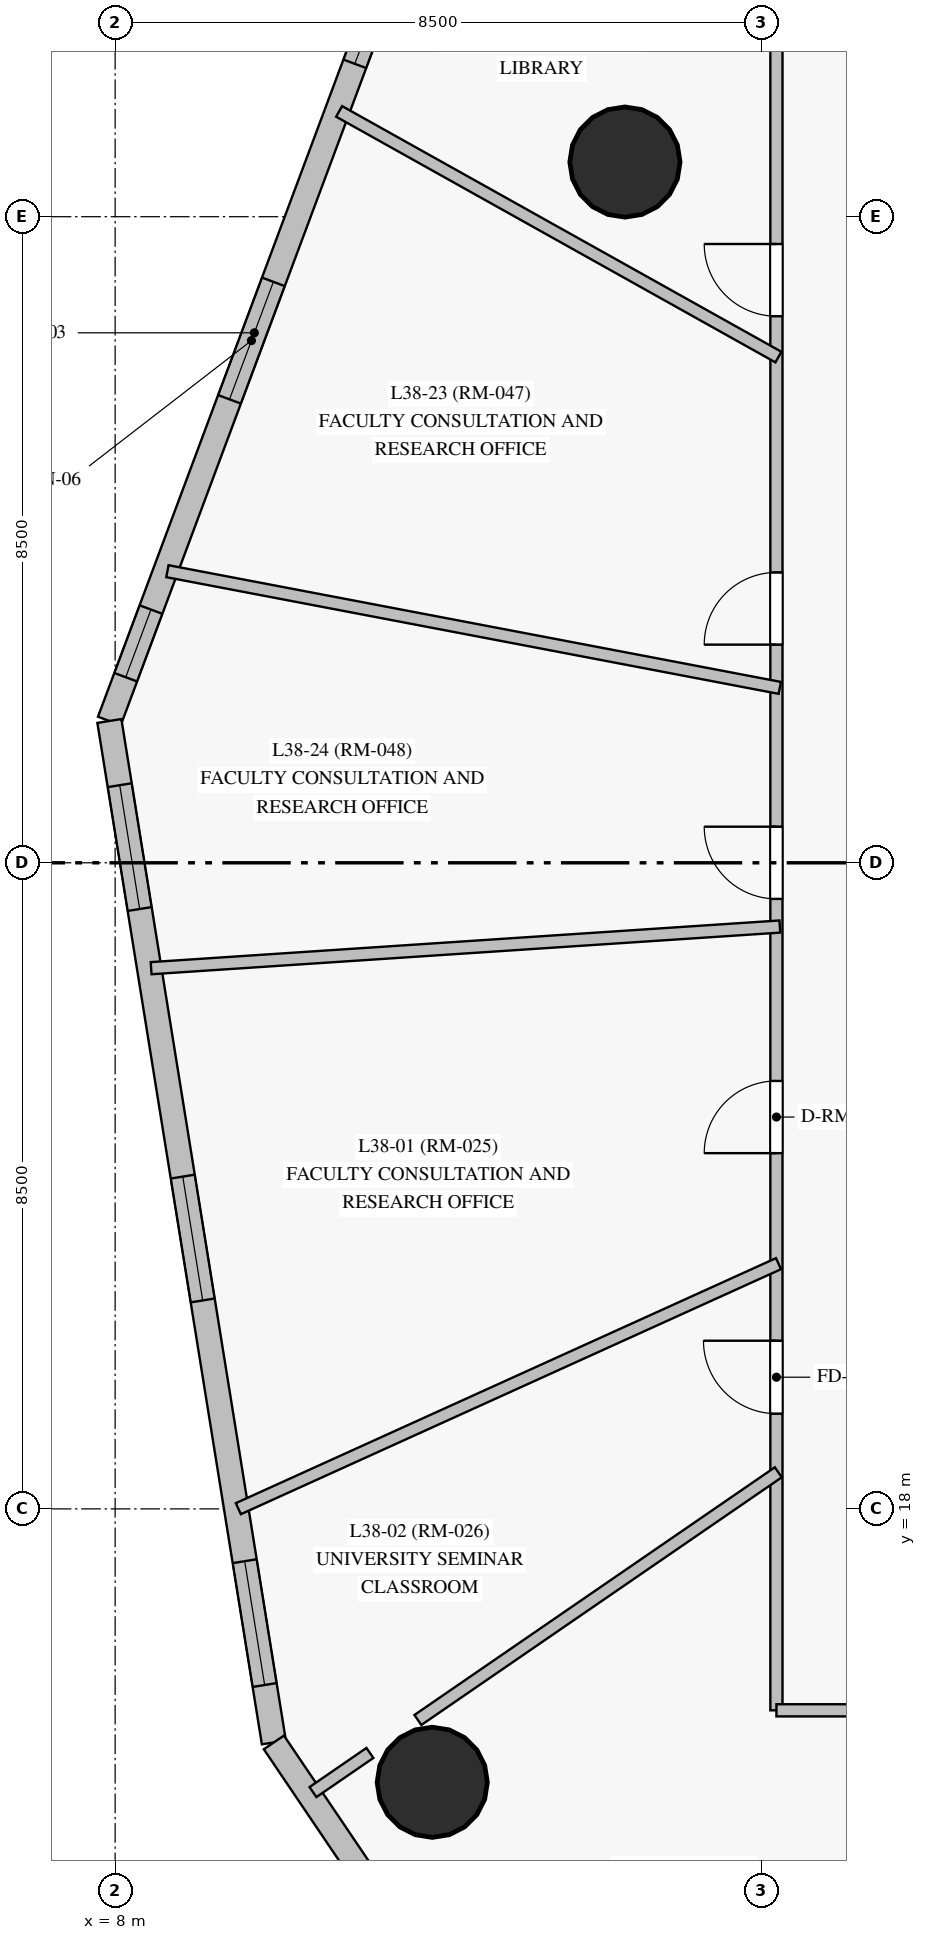
"""IFC4 building model, lengths in metres.
Left out: names, types, materials, properties, quantities, classifications, styles, units other than length and angle.
Written with IfcOpenShell. Run it as: python <this file> out.ifc"""

import sys

from ifc_helpers import new_model, si_unit, direction, frame, frame_2d, origin, origin_with_axes, origin_2d, place, context, subcontext, project, spatial, rectangle, circle, extrude, source, transform, mapped, element, fill, save


model = new_model("IFC4")
c1 = context("Model", 3, precision=1e-05, world=origin(), true_north=direction((0.0, 1.0)))
c2 = subcontext(c1, "Body", "Model", "MODEL_VIEW")
j1 = project(units=[si_unit("LENGTHUNIT", "METRE"), si_unit("PLANEANGLEUNIT", "RADIAN")], contexts=[c1])
p1 = place(None, origin())
s1 = spatial("IfcSite", under=j1, at=p1, CompositionType="ELEMENT")
p2 = place(p1, origin())
s2 = spatial("IfcBuilding", under=s1, at=p2, CompositionType="ELEMENT")
p3 = place(p2, frame((0.0, 0.0, 135.85)))
s3 = spatial("IfcBuildingStorey", under=s2, at=p3, CompositionType="ELEMENT", Elevation=135.85)
m1 = source(origin_with_axes(), c2, "Body", "SweptSolid", [
    extrude(circle(Radius=0.725, at=origin_2d()), origin(), (0.0, 0.0, 1.0), 3.05),
])
for number, where, z_axis, x_axis in (
    (1, (14.707, 35.719, 0.0), (0.0, 0.0, 1.0), (1.0, 0.0, 0.0)),
    (2, (12.172, 14.403, 0.0), (0.0, 0.0, 1.0), (1.0, 0.0, 0.0)),
):
    element("IfcColumn", number, at=place(p3, frame(where, z_axis=z_axis, x_axis=x_axis)), inside=s3, PredefinedType="COLUMN", context=c2, shape_type="MappedRepresentation", body=[
        mapped(m1, transform((0.0, 0.0, 0.0), scale=1.0)),
    ])
p4 = place(p3, frame((11.739, 38.579, 0.0), z_axis=(0.0, 0.0, 1.0), x_axis=(-0.349891213855, -0.936790338586, 0.0)))
e3 = element("IfcWall", 3, at=p4, inside=s3, PredefinedType="SOLIDWALL", context=c2, shape_type="SweptSolid", body=[
    extrude(rectangle(XDim=10.903, YDim=0.32, at=frame_2d((5.451, 0.0))), origin(), (0.0, 0.0, 1.0), 2.825),
])
p5 = place(p4, frame((0.724, 0.0, 0.85)))
e4 = element("IfcOpeningElement", 4, at=p5, cuts=e3, PredefinedType="OPENING", context=c2, shape_type="SweptSolid", body=[
    extrude(rectangle(XDim=0.95, YDim=1.5, at=frame_2d((0.475, 0.75))), frame((0.0, 0.17, 0.0), z_axis=(0.0, -1.0, 0.0), x_axis=(1.0, 0.0, 0.0)), (0.0, 0.0, 1.0), 0.34),
])
p6 = place(p4, frame((4.736, 0.0, 0.85)))
e5 = element("IfcOpeningElement", 5, at=p6, cuts=e3, PredefinedType="OPENING", context=c2, shape_type="SweptSolid", body=[
    extrude(rectangle(XDim=1.65, YDim=1.65, at=frame_2d((0.825, 0.825))), frame((0.0, 0.17, 0.0), z_axis=(0.0, -1.0, 0.0), x_axis=(1.0, 0.0, 0.0)), (0.0, 0.0, 1.0), 0.34),
])
p7 = place(p4, frame((9.338, 0.0, 0.85)))
e6 = element("IfcOpeningElement", 6, at=p7, cuts=e3, PredefinedType="OPENING", context=c2, shape_type="SweptSolid", body=[
    extrude(rectangle(XDim=0.95, YDim=1.5, at=frame_2d((0.475, 0.75))), frame((0.0, 0.17, 0.0), z_axis=(0.0, -1.0, 0.0), x_axis=(1.0, 0.0, 0.0)), (0.0, 0.0, 1.0), 0.34),
])
p8 = place(p3, frame((7.924, 28.366, 0.0), z_axis=(0.0, 0.0, 1.0), x_axis=(0.159012496048, -0.987276570218, 0.0)))
e7 = element("IfcWall", 7, at=p8, inside=s3, PredefinedType="SOLIDWALL", context=c2, shape_type="SweptSolid", body=[
    extrude(rectangle(XDim=13.611, YDim=0.32, at=frame_2d((6.805, 0.0))), origin(), (0.0, 0.0, 1.0), 2.825),
])
p9 = place(p8, frame((0.856, 0.0, 0.85)))
e8 = element("IfcOpeningElement", 8, at=p9, cuts=e7, PredefinedType="OPENING", context=c2, shape_type="SweptSolid", body=[
    extrude(rectangle(XDim=1.65, YDim=1.65, at=frame_2d((0.825, 0.825))), frame((0.0, 0.17, 0.0), z_axis=(0.0, -1.0, 0.0), x_axis=(1.0, 0.0, 0.0)), (0.0, 0.0, 1.0), 0.34),
])
p10 = place(p8, frame((6.072, 0.0, 0.85)))
e9 = element("IfcOpeningElement", 9, at=p10, cuts=e7, PredefinedType="OPENING", context=c2, shape_type="SweptSolid", body=[
    extrude(rectangle(XDim=1.65, YDim=1.65, at=frame_2d((0.825, 0.825))), frame((0.0, 0.17, 0.0), z_axis=(0.0, -1.0, 0.0), x_axis=(1.0, 0.0, 0.0)), (0.0, 0.0, 1.0), 0.34),
])
p11 = place(p8, frame((11.196, 0.0, 0.85)))
e10 = element("IfcOpeningElement", 10, at=p11, cuts=e7, PredefinedType="OPENING", context=c2, shape_type="SweptSolid", body=[
    extrude(rectangle(XDim=1.65, YDim=1.65, at=frame_2d((0.825, 0.825))), frame((0.0, 0.17, 0.0), z_axis=(0.0, -1.0, 0.0), x_axis=(1.0, 0.0, 0.0)), (0.0, 0.0, 1.0), 0.34),
])
p12 = place(p3, frame((10.088, 14.928, 0.0), z_axis=(0.0, 0.0, 1.0), x_axis=(0.559978653474, -0.828507035368, 0.0)))
e11 = element("IfcWall", 11, at=p12, inside=s3, PredefinedType="SOLIDWALL", context=c2, shape_type="SweptSolid", body=[
    extrude(rectangle(XDim=9.416, YDim=0.32, at=frame_2d((4.708, 0.0))), origin(), (0.0, 0.0, 1.0), 2.825),
])
p13 = place(p12, frame((2.241, 0.0, 0.85)))
e12 = element("IfcOpeningElement", 12, at=p13, cuts=e11, PredefinedType="OPENING", context=c2, shape_type="SweptSolid", body=[
    extrude(rectangle(XDim=1.65, YDim=1.65, at=frame_2d((0.825, 0.825))), frame((0.0, 0.17, 0.0), z_axis=(0.0, -1.0, 0.0), x_axis=(1.0, 0.0, 0.0)), (0.0, 0.0, 1.0), 0.34),
])
p14 = place(p12, frame((6.076, 0.0, 0.85)))
e13 = element("IfcOpeningElement", 13, at=p14, cuts=e11, PredefinedType="OPENING", context=c2, shape_type="SweptSolid", body=[
    extrude(rectangle(XDim=1.65, YDim=1.65, at=frame_2d((0.825, 0.825))), frame((0.0, 0.17, 0.0), z_axis=(0.0, -1.0, 0.0), x_axis=(1.0, 0.0, 0.0)), (0.0, 0.0, 1.0), 0.34),
])
p15 = place(p3, frame((16.7, 15.35, 0.0), z_axis=(0.0, 0.0, 1.0), x_axis=(0.0, 1.0, 0.0)))
e14 = element("IfcWall", 14, at=p15, inside=s3, PredefinedType="PARTITIONING", context=c2, shape_type="SweptSolid", body=[
    extrude(rectangle(XDim=22.3, YDim=0.16, at=frame_2d((11.15, 0.0))), origin(), (0.0, 0.0, 1.0), 2.225),
])
p16 = place(p15, frame((7.33, 0.0, 0.0)))
e15 = element("IfcOpeningElement", 15, at=p16, cuts=e14, PredefinedType="OPENING", context=c2, shape_type="SweptSolid", body=[
    extrude(rectangle(XDim=0.95, YDim=2.15, at=frame_2d((0.475, 1.075))), frame((0.0, 0.09, 0.0), z_axis=(0.0, -1.0, 0.0), x_axis=(1.0, 0.0, 0.0)), (0.0, 0.0, 1.0), 0.18),
])
p17 = place(p15, frame((3.903, 0.0, 0.0)))
e16 = element("IfcOpeningElement", 16, at=p17, cuts=e14, PredefinedType="OPENING", context=c2, shape_type="SweptSolid", body=[
    extrude(rectangle(XDim=0.96, YDim=2.15, at=frame_2d((0.48, 1.075))), frame((0.0, 0.09, 0.0), z_axis=(0.0, -1.0, 0.0), x_axis=(1.0, 0.0, 0.0)), (0.0, 0.0, 1.0), 0.18),
])
p18 = place(p15, frame((18.341, 0.0, 0.0)))
e17 = element("IfcOpeningElement", 17, at=p18, cuts=e14, PredefinedType="OPENING", context=c2, shape_type="SweptSolid", body=[
    extrude(rectangle(XDim=0.95, YDim=2.15, at=frame_2d((0.475, 1.075))), frame((0.0, 0.09, 0.0), z_axis=(0.0, -1.0, 0.0), x_axis=(1.0, 0.0, 0.0)), (0.0, 0.0, 1.0), 0.18),
])
p19 = place(p15, frame((14.02, 0.0, 0.0)))
e18 = element("IfcOpeningElement", 18, at=p19, cuts=e14, PredefinedType="OPENING", context=c2, shape_type="SweptSolid", body=[
    extrude(rectangle(XDim=0.95, YDim=2.15, at=frame_2d((0.475, 1.075))), frame((0.0, 0.09, 0.0), z_axis=(0.0, -1.0, 0.0), x_axis=(1.0, 0.0, 0.0)), (0.0, 0.0, 1.0), 0.18),
])
p20 = place(p15, frame((10.675, 0.0, 0.0)))
e19 = element("IfcOpeningElement", 19, at=p20, cuts=e14, PredefinedType="OPENING", context=c2, shape_type="SweptSolid", body=[
    extrude(rectangle(XDim=0.95, YDim=2.15, at=frame_2d((0.475, 1.075))), frame((0.0, 0.09, 0.0), z_axis=(0.0, -1.0, 0.0), x_axis=(1.0, 0.0, 0.0)), (0.0, 0.0, 1.0), 0.18),
])
p21 = place(p3, frame((27.55, 15.35, 0.0), z_axis=(0.0, 0.0, 1.0), x_axis=(-1.0, 0.0, 0.0)))
e20 = element("IfcWall", 20, at=p21, inside=s3, PredefinedType="PARTITIONING", context=c2, shape_type="SweptSolid", body=[
    extrude(rectangle(XDim=10.85, YDim=0.16, at=frame_2d((5.425, 0.0))), origin(), (0.0, 0.0, 1.0), 2.325),
])
p22 = place(p21, frame((7.663, 0.0, 0.0)))
e21 = element("IfcOpeningElement", 21, at=p22, cuts=e20, PredefinedType="OPENING", context=c2, shape_type="SweptSolid", body=[
    extrude(rectangle(XDim=0.95, YDim=2.15, at=frame_2d((0.475, 1.075))), frame((0.0, 0.09, 0.0), z_axis=(0.0, -1.0, 0.0), x_axis=(1.0, 0.0, 0.0)), (0.0, 0.0, 1.0), 0.18),
])
p23 = place(p21, frame((5.19, 0.0, 0.0)))
e22 = element("IfcOpeningElement", 22, at=p23, cuts=e20, PredefinedType="OPENING", context=c2, shape_type="SweptSolid", body=[
    extrude(rectangle(XDim=0.95, YDim=2.15, at=frame_2d((0.475, 1.075))), frame((0.0, 0.09, 0.0), z_axis=(0.0, -1.0, 0.0), x_axis=(1.0, 0.0, 0.0)), (0.0, 0.0, 1.0), 0.18),
])
p24 = place(p21, frame((3.323, 0.0, 0.0)))
e23 = element("IfcOpeningElement", 23, at=p24, cuts=e20, PredefinedType="OPENING", context=c2, shape_type="SweptSolid", body=[
    extrude(rectangle(XDim=0.95, YDim=2.15, at=frame_2d((0.475, 1.075))), frame((0.0, 0.09, 0.0), z_axis=(0.0, -1.0, 0.0), x_axis=(1.0, 0.0, 0.0)), (0.0, 0.0, 1.0), 0.18),
])
p25 = place(p21, frame((0.535, 0.0, 0.0)))
e24 = element("IfcOpeningElement", 24, at=p25, cuts=e20, PredefinedType="OPENING", context=c2, shape_type="SweptSolid", body=[
    extrude(rectangle(XDim=0.86, YDim=2.1, at=frame_2d((0.43, 1.05))), frame((0.0, 0.09, 0.0), z_axis=(0.0, -1.0, 0.0), x_axis=(1.0, 0.0, 0.0)), (0.0, 0.0, 1.0), 0.18),
])
p26 = place(p3, frame((8.473, 25.114, 0.0), z_axis=(0.0, 0.0, 1.0), x_axis=(0.997813863327, 0.066087019548, 0.0)))
e25 = element("IfcWall", 25, at=p26, inside=s3, PredefinedType="PARTITIONING", context=c2, shape_type="SweptSolid", body=[
    extrude(rectangle(XDim=8.29, YDim=0.16, at=frame_2d((4.145, 0.0))), origin(), (0.0, 0.0, 1.0), 2.825),
])
p27 = place(p3, frame((16.744, 28.801, 0.0), z_axis=(0.0, 0.0, 1.0), x_axis=(-0.982325015024, 0.187183238719, 0.0)))
e26 = element("IfcWall", 26, at=p27, inside=s3, PredefinedType="PARTITIONING", context=c2, shape_type="SweptSolid", body=[
    extrude(rectangle(XDim=8.201, YDim=0.16, at=frame_2d((4.101, 0.0))), origin(), (0.0, 0.0, 1.0), 2.825),
])
p28 = place(p3, frame((16.727, 21.226, 0.0), z_axis=(0.0, 0.0, 1.0), x_axis=(-0.910695129443, -0.413079146422, 0.0)))
e27 = element("IfcWall", 27, at=p28, inside=s3, PredefinedType="PARTITIONING", context=c2, shape_type="SweptSolid", body=[
    extrude(rectangle(XDim=7.803, YDim=0.16, at=frame_2d((3.902, 0.0))), origin(), (0.0, 0.0, 1.0), 2.825),
])
p29 = place(p3, frame((20.759, 15.375, 0.0), z_axis=(0.0, 0.0, 1.0), x_axis=(-0.567487382716, -0.823382092627, 0.0)))
e28 = element("IfcWall", 28, at=p29, inside=s3, PredefinedType="PARTITIONING", context=c2, shape_type="SweptSolid", body=[
    extrude(rectangle(XDim=7.11, YDim=0.16, at=frame_2d((3.555, 0.0))), origin(), (0.0, 0.0, 1.0), 2.825),
])
p30 = place(p3, frame((16.726, 33.153, 0.0), z_axis=(0.0, 0.0, 1.0), x_axis=(-0.87280260427, 0.488073369464, 0.0)))
e29 = element("IfcWall", 29, at=p30, inside=s3, PredefinedType="PARTITIONING", context=c2, shape_type="SweptSolid", body=[
    extrude(rectangle(XDim=6.622, YDim=0.16, at=frame_2d((3.311, 0.0))), origin(), (0.0, 0.0, 1.0), 2.825),
])
p31 = place(p3, frame((16.725, 18.481, 0.0), z_axis=(0.0, 0.0, 1.0), x_axis=(-0.8241595355, -0.566357713856, 0.0)))
e30 = element("IfcWall", 30, at=p31, inside=s3, PredefinedType="PARTITIONING", context=c2, shape_type="SweptSolid", body=[
    extrude(rectangle(XDim=5.753, YDim=0.16, at=frame_2d((2.876, 0.0))), origin(), (0.0, 0.0, 1.0), 2.825),
])
p32 = place(p3, frame((11.352, 14.789, 0.0), z_axis=(0.0, 0.0, 1.0), x_axis=(-0.82424554838, -0.566232528186, 0.0)))
e31 = element("IfcWall", 31, at=p32, inside=s3, PredefinedType="PARTITIONING", context=c2, shape_type="SweptSolid", body=[
    extrude(rectangle(XDim=0.909, YDim=0.16, at=frame_2d((0.455, 0.0))), origin(), (0.0, 0.0, 1.0), 2.825),
])
m2 = source(origin_with_axes(), c2, "Body", "SweptSolid", [
    extrude(rectangle(XDim=0.95, YDim=1.5, at=frame_2d((0.475, 0.75))), frame((0.0, 0.03, 0.0), z_axis=(0.0, -1.0, 0.0), x_axis=(1.0, 0.0, 0.0)), (0.0, 0.0, 1.0), 0.06),
])
p33 = place(p5, origin())
e32 = element("IfcWindow", 32, at=p33, inside=s3, PartitioningType="SINGLE_PANEL", PredefinedType="WINDOW", context=c2, shape_type="MappedRepresentation", body=[
    mapped(m2, transform((0.0, 0.0, 0.0), scale=1.0)),
])
fill(e4, e32)
m3 = source(origin_with_axes(), c2, "Body", "SweptSolid", [
    extrude(rectangle(XDim=1.65, YDim=1.65, at=frame_2d((0.825, 0.825))), frame((0.0, 0.03, 0.0), z_axis=(0.0, -1.0, 0.0), x_axis=(1.0, 0.0, 0.0)), (0.0, 0.0, 1.0), 0.06),
])
p34 = place(p6, origin())
e33 = element("IfcWindow", 33, at=p34, inside=s3, PartitioningType="SINGLE_PANEL", PredefinedType="WINDOW", context=c2, shape_type="MappedRepresentation", body=[
    mapped(m3, transform((0.0, 0.0, 0.0), scale=1.0)),
])
fill(e5, e33)
p35 = place(p7, origin())
e34 = element("IfcWindow", 34, at=p35, inside=s3, PartitioningType="SINGLE_PANEL", PredefinedType="WINDOW", context=c2, shape_type="MappedRepresentation", body=[
    mapped(m2, transform((0.0, 0.0, 0.0), scale=1.0)),
])
fill(e6, e34)
p36 = place(p9, origin())
e35 = element("IfcWindow", 35, at=p36, inside=s3, PartitioningType="SINGLE_PANEL", PredefinedType="WINDOW", context=c2, shape_type="MappedRepresentation", body=[
    mapped(m3, transform((0.0, 0.0, 0.0), scale=1.0)),
])
fill(e8, e35)
p37 = place(p10, origin())
e36 = element("IfcWindow", 36, at=p37, inside=s3, PartitioningType="SINGLE_PANEL", PredefinedType="WINDOW", context=c2, shape_type="MappedRepresentation", body=[
    mapped(m3, transform((0.0, 0.0, 0.0), scale=1.0)),
])
fill(e9, e36)
p38 = place(p11, origin())
e37 = element("IfcWindow", 37, at=p38, inside=s3, PartitioningType="SINGLE_PANEL", PredefinedType="WINDOW", context=c2, shape_type="MappedRepresentation", body=[
    mapped(m3, transform((0.0, 0.0, 0.0), scale=1.0)),
])
fill(e10, e37)
m4 = source(origin_with_axes(), c2, "Body", "SweptSolid", [
    extrude(rectangle(XDim=0.95, YDim=2.15, at=frame_2d((0.475, 1.075))), frame((0.0, 0.025, 0.0), z_axis=(0.0, -1.0, 0.0), x_axis=(1.0, 0.0, 0.0)), (0.0, 0.0, 1.0), 0.05),
])
p39 = place(p16, origin())
e38 = element("IfcDoor", 38, at=p39, inside=s3, OperationType="SINGLE_SWING_LEFT", PredefinedType="DOOR", context=c2, shape_type="MappedRepresentation", body=[
    mapped(m4, transform((0.0, 0.0, 0.0), scale=1.0)),
])
fill(e15, e38)
m5 = source(origin_with_axes(), c2, "Body", "SweptSolid", [
    extrude(rectangle(XDim=0.96, YDim=2.15, at=frame_2d((0.48, 1.075))), frame((0.0, 0.025, 0.0), z_axis=(0.0, -1.0, 0.0), x_axis=(1.0, 0.0, 0.0)), (0.0, 0.0, 1.0), 0.05),
])
p40 = place(p17, origin())
e39 = element("IfcDoor", 39, at=p40, inside=s3, OperationType="SINGLE_SWING_RIGHT", PredefinedType="DOOR", context=c2, shape_type="MappedRepresentation", body=[
    mapped(m5, transform((0.0, 0.0, 0.0), scale=1.0)),
])
fill(e16, e39)
p41 = place(p18, origin())
e40 = element("IfcDoor", 40, at=p41, inside=s3, OperationType="SINGLE_SWING_RIGHT", PredefinedType="DOOR", context=c2, shape_type="MappedRepresentation", body=[
    mapped(m4, transform((0.0, 0.0, 0.0), scale=1.0)),
])
fill(e17, e40)
p42 = place(p19, origin())
e41 = element("IfcDoor", 41, at=p42, inside=s3, OperationType="SINGLE_SWING_LEFT", PredefinedType="DOOR", context=c2, shape_type="MappedRepresentation", body=[
    mapped(m4, transform((0.0, 0.0, 0.0), scale=1.0)),
])
fill(e18, e41)
p43 = place(p20, origin())
e42 = element("IfcDoor", 42, at=p43, inside=s3, OperationType="SINGLE_SWING_RIGHT", PredefinedType="DOOR", context=c2, shape_type="MappedRepresentation", body=[
    mapped(m4, transform((0.0, 0.0, 0.0), scale=1.0)),
])
fill(e19, e42)
save(model, sys.argv[1])
